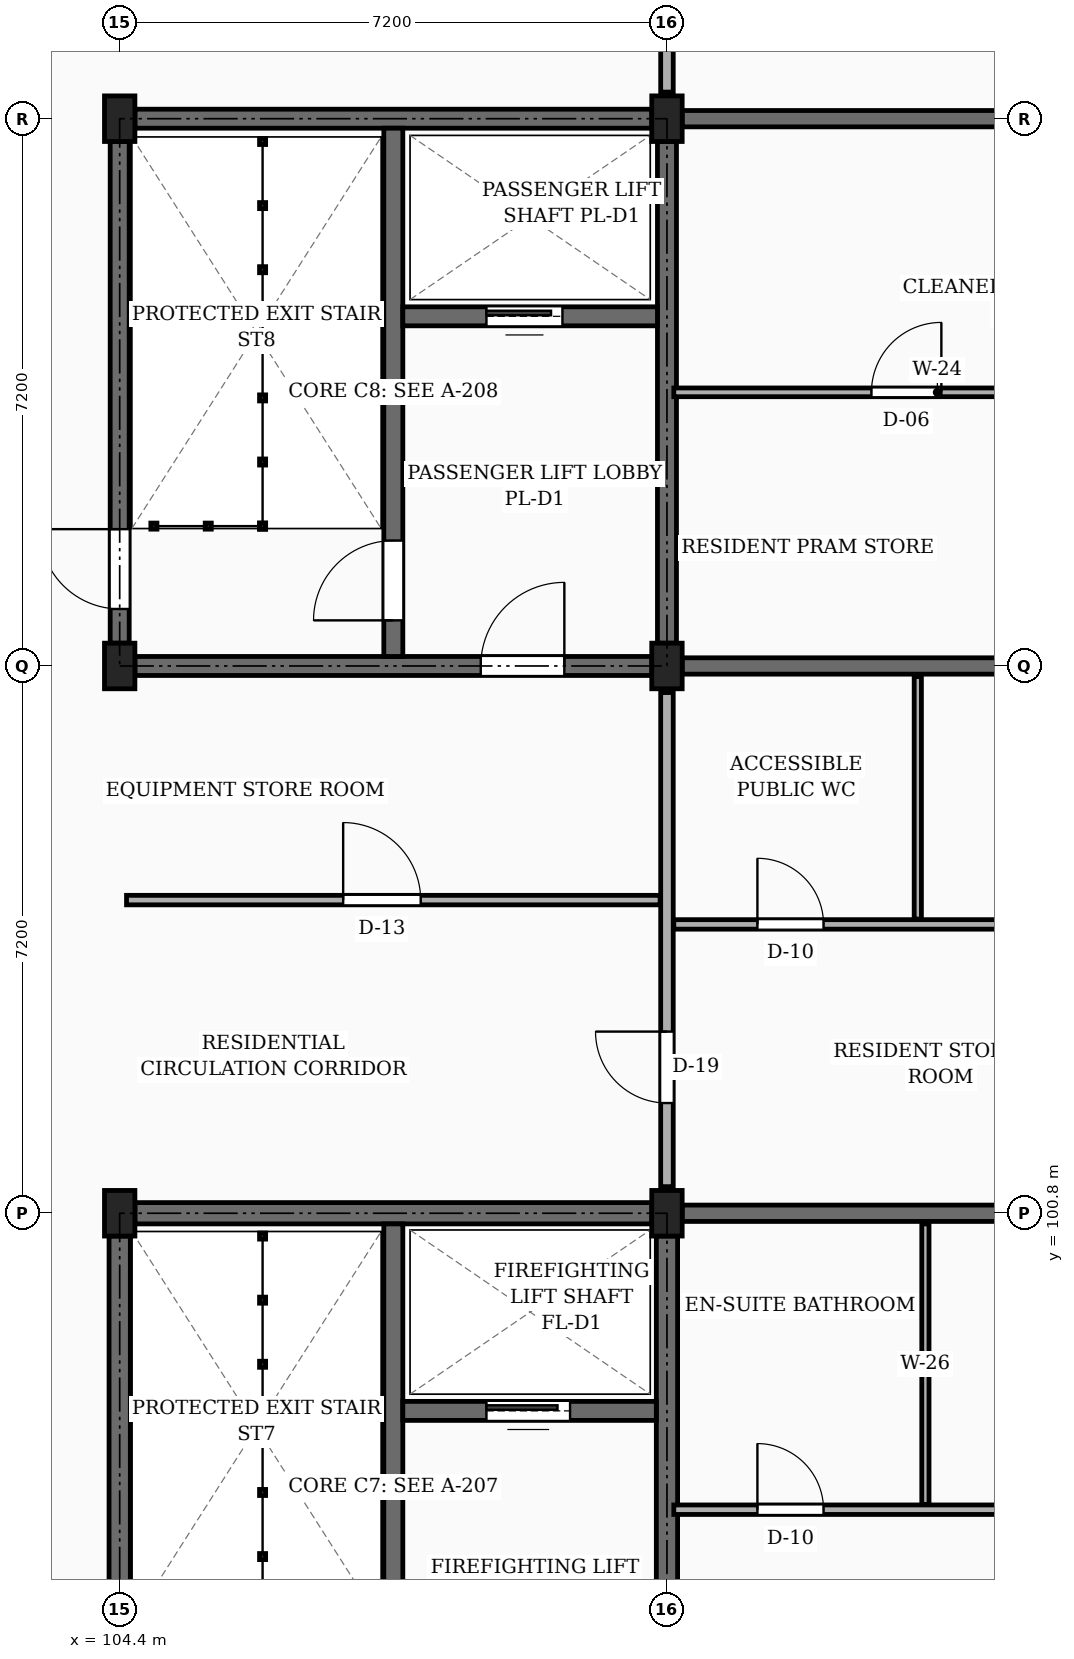
"""IFC4 building model, lengths in metres.
Left out: names, types, materials, properties, quantities, classifications, styles, units other than length and angle.
Written with IfcOpenShell. Run it as: python <this file> out.ifc"""

import sys

from ifc_helpers import new_model, si_unit, direction, frame, frame_2d, origin, origin_2d, place, context, subcontext, project, spatial, rectangle, extrude, element, fill, save


model = new_model("IFC4")
c1 = context("Model", 3, precision=1e-05, world=origin(), true_north=direction((0.0, 1.0)))
c2 = subcontext(c1, "Body", "Model", "MODEL_VIEW")
j1 = project(units=[si_unit("LENGTHUNIT", "METRE"), si_unit("PLANEANGLEUNIT", "RADIAN")], contexts=[c1])
p1 = place(None, origin())
s1 = spatial("IfcSite", under=j1, at=p1, CompositionType="ELEMENT")
p2 = place(p1, origin())
s2 = spatial("IfcBuilding", under=s1, at=p2, CompositionType="ELEMENT")
p3 = place(p2, frame((0.0, 0.0, 32.85)))
s3 = spatial("IfcBuildingStorey", under=s2, at=p3, CompositionType="ELEMENT", Elevation=32.85)
for number, where, z_axis, x_axis in (
    (1, (104.4, 100.8, 0.0), (0.0, 0.0, 1.0), (1.0, 0.0, 0.0)),
    (2, (104.4, 108.0, 0.0), (0.0, 0.0, 1.0), (1.0, 0.0, 0.0)),
    (3, (104.4, 115.2, 0.0), (0.0, 0.0, 1.0), (1.0, 0.0, 0.0)),
    (4, (111.6, 100.8, 0.0), (0.0, 0.0, 1.0), (1.0, 0.0, 0.0)),
    (5, (111.6, 108.0, 0.0), (0.0, 0.0, 1.0), (1.0, 0.0, 0.0)),
    (6, (111.6, 115.2, 0.0), (0.0, 0.0, 1.0), (1.0, 0.0, 0.0)),
):
    element("IfcColumn", number, at=place(p3, frame(where, z_axis=z_axis, x_axis=x_axis)), inside=s3, PredefinedType="COLUMN", context=c2, shape_type="SweptSolid", body=[
        extrude(rectangle(XDim=0.4, YDim=0.6, at=origin_2d()), origin(), (0.0, 0.0, 1.0), 3.15),
    ])
p4 = place(p3, frame((111.8, 100.8, 0.0), z_axis=(0.0, 0.0, 1.0), x_axis=(1.0, 0.0, 0.0)))
e7 = element("IfcWall", 7, at=p4, inside=s3, PredefinedType="SOLIDWALL", context=c2, shape_type="SweptSolid", body=[
    extrude(rectangle(XDim=6.75, YDim=0.215, at=frame_2d((3.375, 0.0))), origin(), (0.0, 0.0, 1.0), 2.22),
])
p5 = place(p3, frame((111.8, 108.0, 0.0), z_axis=(0.0, 0.0, 1.0), x_axis=(1.0, 0.0, 0.0)))
e8 = element("IfcWall", 8, at=p5, inside=s3, PredefinedType="SOLIDWALL", context=c2, shape_type="SweptSolid", body=[
    extrude(rectangle(XDim=6.75, YDim=0.215, at=frame_2d((3.375, 0.0))), origin(), (0.0, 0.0, 1.0), 2.22),
])
p6 = place(p5, frame((4.35, 0.0, 0.0)))
e9 = element("IfcOpeningElement", 9, at=p6, cuts=e8, PredefinedType="OPENING", context=c2, shape_type="SweptSolid", body=[
    extrude(rectangle(XDim=0.98, YDim=2.12, at=frame_2d((0.49, 1.06))), frame((0.0, 0.118, 0.0), z_axis=(0.0, -1.0, 0.0), x_axis=(1.0, 0.0, 0.0)), (0.0, 0.0, 1.0), 0.235),
])
p7 = place(p3, frame((111.8, 115.2, 0.0), z_axis=(0.0, 0.0, 1.0), x_axis=(1.0, 0.0, 0.0)))
e10 = element("IfcWall", 10, at=p7, inside=s3, PredefinedType="SOLIDWALL", context=c2, shape_type="SweptSolid", body=[
    extrude(rectangle(XDim=6.75, YDim=0.215, at=frame_2d((3.375, 0.0))), origin(), (0.0, 0.0, 1.0), 2.22),
])
p8 = place(p3, frame((104.4, 93.9, 0.0), z_axis=(0.0, 0.0, 1.0), x_axis=(0.0, 1.0, 0.0)))
e11 = element("IfcWall", 11, at=p8, inside=s3, PredefinedType="SHEAR", context=c2, shape_type="SweptSolid", body=[
    extrude(rectangle(XDim=6.6, YDim=0.28, at=frame_2d((3.3, 0.0))), origin(), (0.0, 0.0, 1.0), 2.89),
])
p9 = place(p8, frame((0.45, 0.0, 0.0)))
e12 = element("IfcOpeningElement", 12, at=p9, cuts=e11, PredefinedType="OPENING", context=c2, shape_type="SweptSolid", body=[
    extrude(rectangle(XDim=1.05, YDim=2.15, at=frame_2d((0.525, 1.075))), frame((0.0, 0.15, 0.0), z_axis=(0.0, -1.0, 0.0), x_axis=(1.0, 0.0, 0.0)), (0.0, 0.0, 1.0), 0.3),
])
p10 = place(p3, frame((104.6, 100.8, 0.0), z_axis=(0.0, 0.0, 1.0), x_axis=(1.0, 0.0, 0.0)))
e13 = element("IfcWall", 13, at=p10, inside=s3, PredefinedType="SHEAR", context=c2, shape_type="SweptSolid", body=[
    extrude(rectangle(XDim=6.8, YDim=0.28, at=frame_2d((3.4, 0.0))), origin(), (0.0, 0.0, 1.0), 2.89),
])
p11 = place(p3, frame((111.6, 93.9, 0.0), z_axis=(0.0, 0.0, 1.0), x_axis=(0.0, 1.0, 0.0)))
e14 = element("IfcWall", 14, at=p11, inside=s3, PredefinedType="SHEAR", context=c2, shape_type="SweptSolid", body=[
    extrude(rectangle(XDim=6.6, YDim=0.28, at=frame_2d((3.3, 0.0))), origin(), (0.0, 0.0, 1.0), 2.89),
])
p12 = place(p3, frame((108.0, 93.74, 0.0), z_axis=(0.0, 0.0, 1.0), x_axis=(0.0, 1.0, 0.0)))
e15 = element("IfcWall", 15, at=p12, inside=s3, PredefinedType="SHEAR", context=c2, shape_type="SweptSolid", body=[
    extrude(rectangle(XDim=6.92, YDim=0.25, at=frame_2d((3.46, 0.0))), origin(), (0.0, 0.0, 1.0), 2.89),
])
p13 = place(p12, frame((0.46, 0.0, 0.0)))
e16 = element("IfcOpeningElement", 16, at=p13, cuts=e15, PredefinedType="OPENING", context=c2, shape_type="SweptSolid", body=[
    extrude(rectangle(XDim=1.05, YDim=2.15, at=frame_2d((0.525, 1.075))), frame((0.0, 0.135, 0.0), z_axis=(0.0, -1.0, 0.0), x_axis=(1.0, 0.0, 0.0)), (0.0, 0.0, 1.0), 0.27),
])
p14 = place(p3, frame((108.125, 98.2, 0.0), z_axis=(0.0, 0.0, 1.0), x_axis=(1.0, 0.0, 0.0)))
e17 = element("IfcWall", 17, at=p14, inside=s3, PredefinedType="SHEAR", context=c2, shape_type="SweptSolid", body=[
    extrude(rectangle(XDim=3.335, YDim=0.25, at=frame_2d((1.667, 0.0))), origin(), (0.0, 0.0, 1.0), 2.89),
])
p15 = place(p14, frame((1.1, 0.0, 0.0)))
e18 = element("IfcOpeningElement", 18, at=p15, cuts=e17, PredefinedType="OPENING", context=c2, shape_type="SweptSolid", body=[
    extrude(rectangle(XDim=1.1, YDim=2.2, at=frame_2d((0.55, 1.1))), frame((0.0, 0.135, 0.0), z_axis=(0.0, -1.0, 0.0), x_axis=(1.0, 0.0, 0.0)), (0.0, 0.0, 1.0), 0.27),
])
p16 = place(p3, frame((104.4, 108.3, 0.0), z_axis=(0.0, 0.0, 1.0), x_axis=(0.0, 1.0, 0.0)))
e19 = element("IfcWall", 19, at=p16, inside=s3, PredefinedType="SHEAR", context=c2, shape_type="SweptSolid", body=[
    extrude(rectangle(XDim=6.6, YDim=0.25, at=frame_2d((3.3, 0.0))), origin(), (0.0, 0.0, 1.0), 2.89),
])
p17 = place(p16, frame((0.45, 0.0, 0.0)))
e20 = element("IfcOpeningElement", 20, at=p17, cuts=e19, PredefinedType="OPENING", context=c2, shape_type="SweptSolid", body=[
    extrude(rectangle(XDim=1.05, YDim=2.15, at=frame_2d((0.525, 1.075))), frame((0.0, 0.135, 0.0), z_axis=(0.0, -1.0, 0.0), x_axis=(1.0, 0.0, 0.0)), (0.0, 0.0, 1.0), 0.27),
])
p18 = place(p3, frame((104.6, 115.2, 0.0), z_axis=(0.0, 0.0, 1.0), x_axis=(1.0, 0.0, 0.0)))
e21 = element("IfcWall", 21, at=p18, inside=s3, PredefinedType="SHEAR", context=c2, shape_type="SweptSolid", body=[
    extrude(rectangle(XDim=6.8, YDim=0.25, at=frame_2d((3.4, 0.0))), origin(), (0.0, 0.0, 1.0), 2.89),
])
p19 = place(p3, frame((111.6, 108.3, 0.0), z_axis=(0.0, 0.0, 1.0), x_axis=(0.0, 1.0, 0.0)))
e22 = element("IfcWall", 22, at=p19, inside=s3, PredefinedType="SHEAR", context=c2, shape_type="SweptSolid", body=[
    extrude(rectangle(XDim=6.6, YDim=0.25, at=frame_2d((3.3, 0.0))), origin(), (0.0, 0.0, 1.0), 2.89),
])
p20 = place(p3, frame((104.6, 108.0, 0.0), z_axis=(0.0, 0.0, 1.0), x_axis=(1.0, 0.0, 0.0)))
e23 = element("IfcWall", 23, at=p20, inside=s3, PredefinedType="SHEAR", context=c2, shape_type="SweptSolid", body=[
    extrude(rectangle(XDim=6.8, YDim=0.25, at=frame_2d((3.4, 0.0))), origin(), (0.0, 0.0, 1.0), 2.89),
])
p21 = place(p20, frame((4.55, 0.0, 0.0)))
e24 = element("IfcOpeningElement", 24, at=p21, cuts=e23, PredefinedType="OPENING", context=c2, shape_type="SweptSolid", body=[
    extrude(rectangle(XDim=1.1, YDim=2.15, at=frame_2d((0.55, 1.075))), frame((0.0, 0.135, 0.0), z_axis=(0.0, -1.0, 0.0), x_axis=(1.0, 0.0, 0.0)), (0.0, 0.0, 1.0), 0.27),
])
p22 = place(p3, frame((108.0, 108.125, 0.0), z_axis=(0.0, 0.0, 1.0), x_axis=(0.0, 1.0, 0.0)))
e25 = element("IfcWall", 25, at=p22, inside=s3, PredefinedType="SHEAR", context=c2, shape_type="SweptSolid", body=[
    extrude(rectangle(XDim=6.95, YDim=0.25, at=frame_2d((3.475, 0.0))), origin(), (0.0, 0.0, 1.0), 2.89),
])
p23 = place(p22, frame((0.475, 0.0, 0.0)))
e26 = element("IfcOpeningElement", 26, at=p23, cuts=e25, PredefinedType="OPENING", context=c2, shape_type="SweptSolid", body=[
    extrude(rectangle(XDim=1.05, YDim=2.15, at=frame_2d((0.525, 1.075))), frame((0.0, 0.135, 0.0), z_axis=(0.0, -1.0, 0.0), x_axis=(1.0, 0.0, 0.0)), (0.0, 0.0, 1.0), 0.27),
])
p24 = place(p3, frame((108.125, 112.6, 0.0), z_axis=(0.0, 0.0, 1.0), x_axis=(1.0, 0.0, 0.0)))
e27 = element("IfcWall", 27, at=p24, inside=s3, PredefinedType="SHEAR", context=c2, shape_type="SweptSolid", body=[
    extrude(rectangle(XDim=3.35, YDim=0.25, at=frame_2d((1.675, 0.0))), origin(), (0.0, 0.0, 1.0), 2.89),
])
p25 = place(p24, frame((1.1, 0.0, 0.0)))
e28 = element("IfcOpeningElement", 28, at=p25, cuts=e27, PredefinedType="OPENING", context=c2, shape_type="SweptSolid", body=[
    extrude(rectangle(XDim=1.0, YDim=2.2, at=frame_2d((0.5, 1.1))), frame((0.0, 0.135, 0.0), z_axis=(0.0, -1.0, 0.0), x_axis=(1.0, 0.0, 0.0)), (0.0, 0.0, 1.0), 0.27),
])
p26 = place(p3, frame((111.6, 101.15, 0.0), z_axis=(0.0, 0.0, 1.0), x_axis=(0.0, 1.0, 0.0)))
e29 = element("IfcWall", 29, at=p26, inside=s3, PredefinedType="PARTITIONING", context=c2, shape_type="SweptSolid", body=[
    extrude(rectangle(XDim=6.5, YDim=0.165, at=frame_2d((3.25, 0.0))), origin(), (0.0, 0.0, 1.0), 2.325),
])
p27 = place(p26, frame((1.1, 0.0, 0.0)))
e30 = element("IfcOpeningElement", 30, at=p27, cuts=e29, PredefinedType="OPENING", context=c2, shape_type="SweptSolid", body=[
    extrude(rectangle(XDim=0.94, YDim=2.12, at=frame_2d((0.47, 1.06))), frame((0.0, 0.093, 0.0), z_axis=(0.0, -1.0, 0.0), x_axis=(1.0, 0.0, 0.0)), (0.0, 0.0, 1.0), 0.185),
])
p28 = place(p3, frame((111.6, 115.55, 0.0), z_axis=(0.0, 0.0, 1.0), x_axis=(0.0, 1.0, 0.0)))
e31 = element("IfcWall", 31, at=p28, inside=s3, PredefinedType="PARTITIONING", context=c2, shape_type="SweptSolid", body=[
    extrude(rectangle(XDim=6.5, YDim=0.165, at=frame_2d((3.25, 0.0))), origin(), (0.0, 0.0, 1.0), 2.325),
])
p29 = place(p28, frame((1.1, 0.0, 0.0)))
e32 = element("IfcOpeningElement", 32, at=p29, cuts=e31, PredefinedType="OPENING", context=c2, shape_type="SweptSolid", body=[
    extrude(rectangle(XDim=1.14, YDim=2.18, at=frame_2d((0.57, 1.09))), frame((0.0, 0.093, 0.0), z_axis=(0.0, -1.0, 0.0), x_axis=(1.0, 0.0, 0.0)), (0.0, 0.0, 1.0), 0.185),
])
p30 = place(p3, frame((111.69, 96.9, 0.0), z_axis=(0.0, 0.0, 1.0), x_axis=(1.0, 0.0, 0.0)))
e33 = element("IfcWall", 33, at=p30, inside=s3, PredefinedType="PARTITIONING", context=c2, shape_type="SweptSolid", body=[
    extrude(rectangle(XDim=6.935, YDim=0.125, at=frame_2d((3.468, 0.0))), origin(), (0.0, 0.0, 1.0), 2.325),
])
p31 = place(p30, frame((1.1, 0.0, 0.0)))
e34 = element("IfcOpeningElement", 34, at=p31, cuts=e33, PredefinedType="OPENING", context=c2, shape_type="SweptSolid", body=[
    extrude(rectangle(XDim=0.87, YDim=2.05, at=frame_2d((0.435, 1.025))), frame((0.0, 0.073, 0.0), z_axis=(0.0, -1.0, 0.0), x_axis=(1.0, 0.0, 0.0)), (0.0, 0.0, 1.0), 0.145),
])
p32 = place(p30, frame((4.5, 0.0, 0.0)))
e35 = element("IfcOpeningElement", 35, at=p32, cuts=e33, PredefinedType="OPENING", context=c2, shape_type="SweptSolid", body=[
    extrude(rectangle(XDim=0.88, YDim=2.08, at=frame_2d((0.44, 1.04))), frame((0.0, 0.073, 0.0), z_axis=(0.0, -1.0, 0.0), x_axis=(1.0, 0.0, 0.0)), (0.0, 0.0, 1.0), 0.145),
])
p33 = place(p3, frame((115.0, 96.97, 0.0), z_axis=(0.0, 0.0, 1.0), x_axis=(0.0, 1.0, 0.0)))
e36 = element("IfcWall", 36, at=p33, inside=s3, PredefinedType="PARTITIONING", context=c2, shape_type="SweptSolid", body=[
    extrude(rectangle(XDim=3.69, YDim=0.095, at=frame_2d((1.845, 0.0))), origin(), (0.0, 0.0, 1.0), 2.325),
])
p34 = place(p3, frame((104.49, 104.92, 0.0), z_axis=(0.0, 0.0, 1.0), x_axis=(1.0, 0.0, 0.0)))
e37 = element("IfcWall", 37, at=p34, inside=s3, PredefinedType="PARTITIONING", context=c2, shape_type="SweptSolid", body=[
    extrude(rectangle(XDim=7.02, YDim=0.125, at=frame_2d((3.51, 0.0))), origin(), (0.0, 0.0, 1.0), 2.325),
])
p35 = place(p34, frame((2.85, 0.0, 0.0)))
e38 = element("IfcOpeningElement", 38, at=p35, cuts=e37, PredefinedType="OPENING", context=c2, shape_type="SweptSolid", body=[
    extrude(rectangle(XDim=1.02, YDim=2.15, at=frame_2d((0.51, 1.075))), frame((0.0, 0.073, 0.0), z_axis=(0.0, -1.0, 0.0), x_axis=(1.0, 0.0, 0.0)), (0.0, 0.0, 1.0), 0.145),
])
p36 = place(p3, frame((111.69, 104.6, 0.0), z_axis=(0.0, 0.0, 1.0), x_axis=(1.0, 0.0, 0.0)))
e39 = element("IfcWall", 39, at=p36, inside=s3, PredefinedType="PARTITIONING", context=c2, shape_type="SweptSolid", body=[
    extrude(rectangle(XDim=6.935, YDim=0.125, at=frame_2d((3.468, 0.0))), origin(), (0.0, 0.0, 1.0), 2.325),
])
p37 = place(p36, frame((1.1, 0.0, 0.0)))
e40 = element("IfcOpeningElement", 40, at=p37, cuts=e39, PredefinedType="OPENING", context=c2, shape_type="SweptSolid", body=[
    extrude(rectangle(XDim=0.87, YDim=2.05, at=frame_2d((0.435, 1.025))), frame((0.0, 0.073, 0.0), z_axis=(0.0, -1.0, 0.0), x_axis=(1.0, 0.0, 0.0)), (0.0, 0.0, 1.0), 0.145),
])
p38 = place(p36, frame((4.5, 0.0, 0.0)))
e41 = element("IfcOpeningElement", 41, at=p38, cuts=e39, PredefinedType="OPENING", context=c2, shape_type="SweptSolid", body=[
    extrude(rectangle(XDim=0.92, YDim=2.1, at=frame_2d((0.46, 1.05))), frame((0.0, 0.073, 0.0), z_axis=(0.0, -1.0, 0.0), x_axis=(1.0, 0.0, 0.0)), (0.0, 0.0, 1.0), 0.145),
])
p39 = place(p3, frame((114.9, 104.67, 0.0), z_axis=(0.0, 0.0, 1.0), x_axis=(0.0, 1.0, 0.0)))
e42 = element("IfcWall", 42, at=p39, inside=s3, PredefinedType="PARTITIONING", context=c2, shape_type="SweptSolid", body=[
    extrude(rectangle(XDim=3.19, YDim=0.095, at=frame_2d((1.595, 0.0))), origin(), (0.0, 0.0, 1.0), 2.325),
])
p40 = place(p3, frame((111.69, 111.6, 0.0), z_axis=(0.0, 0.0, 1.0), x_axis=(1.0, 0.0, 0.0)))
e43 = element("IfcWall", 43, at=p40, inside=s3, PredefinedType="PARTITIONING", context=c2, shape_type="SweptSolid", body=[
    extrude(rectangle(XDim=6.935, YDim=0.115, at=frame_2d((3.468, 0.0))), origin(), (0.0, 0.0, 1.0), 2.325),
])
p41 = place(p40, frame((2.6, 0.0, 0.0)))
e44 = element("IfcOpeningElement", 44, at=p41, cuts=e43, PredefinedType="OPENING", context=c2, shape_type="SweptSolid", body=[
    extrude(rectangle(XDim=0.92, YDim=2.1, at=frame_2d((0.46, 1.05))), frame((0.0, 0.067, 0.0), z_axis=(0.0, -1.0, 0.0), x_axis=(1.0, 0.0, 0.0)), (0.0, 0.0, 1.0), 0.135),
])
p42 = place(p15, origin())
e45 = element("IfcDoor", 45, at=p42, inside=s3, OperationType="SLIDING_TO_LEFT", PredefinedType="DOOR", context=c2, shape_type="SweptSolid", body=[
    extrude(rectangle(XDim=1.1, YDim=2.2, at=frame_2d((0.55, 1.1))), frame((0.0, 0.025, 0.0), z_axis=(0.0, -1.0, 0.0), x_axis=(1.0, 0.0, 0.0)), (0.0, 0.0, 1.0), 0.05),
])
fill(e18, e45)
p43 = place(p17, origin())
e46 = element("IfcDoor", 46, at=p43, inside=s3, OperationType="SINGLE_SWING_RIGHT", PredefinedType="DOOR", context=c2, shape_type="SweptSolid", body=[
    extrude(rectangle(XDim=1.05, YDim=2.15, at=frame_2d((0.525, 1.075))), frame((0.0, 0.025, 0.0), z_axis=(0.0, -1.0, 0.0), x_axis=(1.0, 0.0, 0.0)), (0.0, 0.0, 1.0), 0.05),
])
fill(e20, e46)
p44 = place(p21, frame((1.1, 0.0, 0.0), z_axis=(0.0, 0.0, 1.0), x_axis=(-1.0, 0.0, 0.0)))
e47 = element("IfcDoor", 47, at=p44, inside=s3, OperationType="SINGLE_SWING_RIGHT", PredefinedType="DOOR", context=c2, shape_type="SweptSolid", body=[
    extrude(rectangle(XDim=1.1, YDim=2.15, at=frame_2d((0.55, 1.075))), frame((0.0, 0.025, 0.0), z_axis=(0.0, -1.0, 0.0), x_axis=(1.0, 0.0, 0.0)), (0.0, 0.0, 1.0), 0.05),
])
fill(e24, e47)
p45 = place(p23, origin())
e48 = element("IfcDoor", 48, at=p45, inside=s3, OperationType="SINGLE_SWING_LEFT", PredefinedType="DOOR", context=c2, shape_type="SweptSolid", body=[
    extrude(rectangle(XDim=1.05, YDim=2.15, at=frame_2d((0.525, 1.075))), frame((0.0, 0.025, 0.0), z_axis=(0.0, -1.0, 0.0), x_axis=(1.0, 0.0, 0.0)), (0.0, 0.0, 1.0), 0.05),
])
fill(e26, e48)
p46 = place(p25, origin())
e49 = element("IfcDoor", 49, at=p46, inside=s3, OperationType="SLIDING_TO_LEFT", PredefinedType="DOOR", context=c2, shape_type="SweptSolid", body=[
    extrude(rectangle(XDim=1.0, YDim=2.2, at=frame_2d((0.5, 1.1))), frame((0.0, 0.025, 0.0), z_axis=(0.0, -1.0, 0.0), x_axis=(1.0, 0.0, 0.0)), (0.0, 0.0, 1.0), 0.05),
])
fill(e28, e49)
p47 = place(p27, origin())
e50 = element("IfcDoor", 50, at=p47, inside=s3, OperationType="SINGLE_SWING_RIGHT", PredefinedType="DOOR", context=c2, shape_type="SweptSolid", body=[
    extrude(rectangle(XDim=0.94, YDim=2.12, at=frame_2d((0.47, 1.06))), frame((0.0, 0.025, 0.0), z_axis=(0.0, -1.0, 0.0), x_axis=(1.0, 0.0, 0.0)), (0.0, 0.0, 1.0), 0.05),
])
fill(e30, e50)
p48 = place(p31, origin())
e51 = element("IfcDoor", 51, at=p48, inside=s3, OperationType="SINGLE_SWING_LEFT", PredefinedType="DOOR", context=c2, shape_type="SweptSolid", body=[
    extrude(rectangle(XDim=0.87, YDim=2.05, at=frame_2d((0.435, 1.025))), frame((0.0, 0.025, 0.0), z_axis=(0.0, -1.0, 0.0), x_axis=(1.0, 0.0, 0.0)), (0.0, 0.0, 1.0), 0.05),
])
fill(e34, e51)
p49 = place(p35, origin())
e52 = element("IfcDoor", 52, at=p49, inside=s3, OperationType="SINGLE_SWING_LEFT", PredefinedType="DOOR", context=c2, shape_type="SweptSolid", body=[
    extrude(rectangle(XDim=1.02, YDim=2.15, at=frame_2d((0.51, 1.075))), frame((0.0, 0.025, 0.0), z_axis=(0.0, -1.0, 0.0), x_axis=(1.0, 0.0, 0.0)), (0.0, 0.0, 1.0), 0.05),
])
fill(e38, e52)
p50 = place(p37, origin())
e53 = element("IfcDoor", 53, at=p50, inside=s3, OperationType="SINGLE_SWING_LEFT", PredefinedType="DOOR", context=c2, shape_type="SweptSolid", body=[
    extrude(rectangle(XDim=0.87, YDim=2.05, at=frame_2d((0.435, 1.025))), frame((0.0, 0.025, 0.0), z_axis=(0.0, -1.0, 0.0), x_axis=(1.0, 0.0, 0.0)), (0.0, 0.0, 1.0), 0.05),
])
fill(e40, e53)
p51 = place(p41, origin())
e54 = element("IfcDoor", 54, at=p51, inside=s3, OperationType="SINGLE_SWING_RIGHT", PredefinedType="DOOR", context=c2, shape_type="SweptSolid", body=[
    extrude(rectangle(XDim=0.92, YDim=2.1, at=frame_2d((0.46, 1.05))), frame((0.0, 0.025, 0.0), z_axis=(0.0, -1.0, 0.0), x_axis=(1.0, 0.0, 0.0)), (0.0, 0.0, 1.0), 0.05),
])
fill(e44, e54)
save(model, sys.argv[1])
